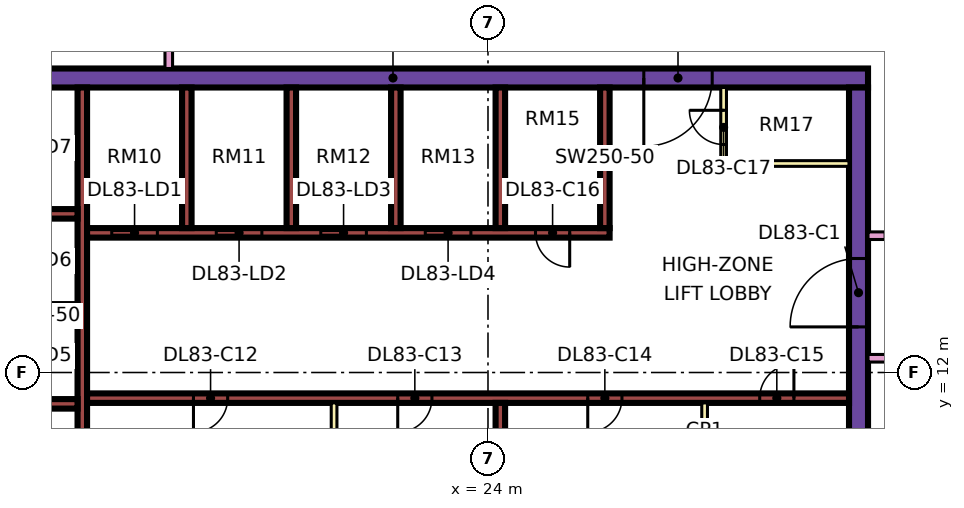
"""IFC4 building model, lengths in metres.
Left out: names, types, materials, properties, quantities, classifications, styles, units other than length and angle.
Written with IfcOpenShell. Run it as: python <this file> out.ifc"""

import sys

from ifc_helpers import new_model, si_unit, direction, frame, frame_2d, origin, place, context, subcontext, project, spatial, rectangle, extrude, element, fill, save


model = new_model("IFC4")
c1 = context("Model", 3, precision=1e-05, world=origin(), true_north=direction((0.0, 1.0)))
c2 = subcontext(c1, "Body", "Model", "MODEL_VIEW")
j1 = project(units=[si_unit("LENGTHUNIT", "METRE"), si_unit("PLANEANGLEUNIT", "RADIAN")], contexts=[c1])
p1 = place(None, origin())
s1 = spatial("IfcSite", under=j1, at=p1, CompositionType="ELEMENT")
p2 = place(p1, origin())
s2 = spatial("IfcBuilding", under=s1, at=p2, CompositionType="ELEMENT")
p3 = place(p2, frame((0.0, 0.0, 357.65)))
s3 = spatial("IfcBuildingStorey", under=s2, at=p3, CompositionType="ELEMENT", Elevation=357.65)
p4 = place(p3, frame((9.0, 19.75, 0.0), z_axis=(0.0, 0.0, 1.0), x_axis=(1.0, 0.0, 0.0)))
e1 = element("IfcWall", 1, at=p4, inside=s3, PredefinedType="SHEAR", context=c2, shape_type="SweptSolid", body=[
    extrude(rectangle(XDim=25.0, YDim=0.5, at=frame_2d((12.5, 0.0))), origin(), (0.0, 0.0, 1.0), 3.75),
])
p5 = place(p4, frame((19.1, 0.0, 0.0)))
e2 = element("IfcOpeningElement", 2, at=p5, cuts=e1, PredefinedType="OPENING", context=c2, shape_type="SweptSolid", body=[
    extrude(rectangle(XDim=1.8, YDim=2.4, at=frame_2d((0.9, 1.2))), frame((0.0, 0.26, 0.0), z_axis=(0.0, -1.0, 0.0), x_axis=(1.0, 0.0, 0.0)), (0.0, 0.0, 1.0), 0.52),
])
p6 = place(p3, frame((33.75, 7.5, 0.0), z_axis=(0.0, 0.0, 1.0), x_axis=(0.0, 1.0, 0.0)))
e3 = element("IfcWall", 3, at=p6, inside=s3, PredefinedType="SHEAR", context=c2, shape_type="SweptSolid", body=[
    extrude(rectangle(XDim=12.0, YDim=0.5, at=frame_2d((6.0, 0.0))), origin(), (0.0, 0.0, 1.0), 3.75),
])
p7 = place(p6, frame((5.7, 0.0, 0.0)))
e4 = element("IfcOpeningElement", 4, at=p7, cuts=e3, PredefinedType="OPENING", context=c2, shape_type="SweptSolid", body=[
    extrude(rectangle(XDim=1.8, YDim=2.4, at=frame_2d((0.9, 1.2))), frame((0.0, 0.26, 0.0), z_axis=(0.0, -1.0, 0.0), x_axis=(1.0, 0.0, 0.0)), (0.0, 0.0, 1.0), 0.52),
])
p8 = place(p3, frame((13.325, 7.5, 0.0), z_axis=(0.0, 0.0, 1.0), x_axis=(0.0, 1.0, 0.0)))
e5 = element("IfcWall", 5, at=p8, inside=s3, PredefinedType="SHEAR", context=c2, shape_type="SweptSolid", body=[
    extrude(rectangle(XDim=12.0, YDim=0.25, at=frame_2d((6.0, 0.0))), origin(), (0.0, 0.0, 1.0), 3.75),
])
p9 = place(p3, frame((13.45, 11.325, 0.0), z_axis=(0.0, 0.0, 1.0), x_axis=(1.0, 0.0, 0.0)))
e6 = element("IfcWall", 6, at=p9, inside=s3, PredefinedType="SHEAR", context=c2, shape_type="SweptSolid", body=[
    extrude(rectangle(XDim=20.05, YDim=0.25, at=frame_2d((10.025, 0.0))), origin(), (0.0, 0.0, 1.0), 3.75),
])
p10 = place(p9, frame((2.8, 0.0, 0.0)))
e7 = element("IfcOpeningElement", 7, at=p10, cuts=e6, PredefinedType="OPENING", context=c2, shape_type="SweptSolid", body=[
    extrude(rectangle(XDim=0.9, YDim=2.1, at=frame_2d((0.45, 1.05))), frame((0.0, 0.135, 0.0), z_axis=(0.0, -1.0, 0.0), x_axis=(1.0, 0.0, 0.0)), (0.0, 0.0, 1.0), 0.27),
])
p11 = place(p9, frame((8.175, 0.0, 0.0)))
e8 = element("IfcOpeningElement", 8, at=p11, cuts=e6, PredefinedType="OPENING", context=c2, shape_type="SweptSolid", body=[
    extrude(rectangle(XDim=0.9, YDim=2.1, at=frame_2d((0.45, 1.05))), frame((0.0, 0.135, 0.0), z_axis=(0.0, -1.0, 0.0), x_axis=(1.0, 0.0, 0.0)), (0.0, 0.0, 1.0), 0.27),
])
p12 = place(p9, frame((13.175, 0.0, 0.0)))
e9 = element("IfcOpeningElement", 9, at=p12, cuts=e6, PredefinedType="OPENING", context=c2, shape_type="SweptSolid", body=[
    extrude(rectangle(XDim=0.9, YDim=2.1, at=frame_2d((0.45, 1.05))), frame((0.0, 0.135, 0.0), z_axis=(0.0, -1.0, 0.0), x_axis=(1.0, 0.0, 0.0)), (0.0, 0.0, 1.0), 0.27),
])
p13 = place(p9, frame((17.7, 0.0, 0.0)))
e10 = element("IfcOpeningElement", 10, at=p13, cuts=e6, PredefinedType="OPENING", context=c2, shape_type="SweptSolid", body=[
    extrude(rectangle(XDim=0.9, YDim=2.1, at=frame_2d((0.45, 1.05))), frame((0.0, 0.135, 0.0), z_axis=(0.0, -1.0, 0.0), x_axis=(1.0, 0.0, 0.0)), (0.0, 0.0, 1.0), 0.27),
])
p14 = place(p3, frame((13.45, 15.675, 0.0), z_axis=(0.0, 0.0, 1.0), x_axis=(1.0, 0.0, 0.0)))
e11 = element("IfcWall", 11, at=p14, inside=s3, PredefinedType="SHEAR", context=c2, shape_type="SweptSolid", body=[
    extrude(rectangle(XDim=13.75, YDim=0.25, at=frame_2d((6.875, 0.0))), origin(), (0.0, 0.0, 1.0), 3.75),
])
p15 = place(p14, frame((0.65, 0.0, 0.0)))
e12 = element("IfcOpeningElement", 12, at=p15, cuts=e11, PredefinedType="OPENING", context=c2, shape_type="SweptSolid", body=[
    extrude(rectangle(XDim=1.2, YDim=2.2, at=frame_2d((0.6, 1.1))), frame((0.0, 0.135, 0.0), z_axis=(0.0, -1.0, 0.0), x_axis=(1.0, 0.0, 0.0)), (0.0, 0.0, 1.0), 0.27),
])
p16 = place(p14, frame((3.4, 0.0, 0.0)))
e13 = element("IfcOpeningElement", 13, at=p16, cuts=e11, PredefinedType="OPENING", context=c2, shape_type="SweptSolid", body=[
    extrude(rectangle(XDim=1.2, YDim=2.2, at=frame_2d((0.6, 1.1))), frame((0.0, 0.135, 0.0), z_axis=(0.0, -1.0, 0.0), x_axis=(1.0, 0.0, 0.0)), (0.0, 0.0, 1.0), 0.27),
])
p17 = place(p14, frame((6.15, 0.0, 0.0)))
e14 = element("IfcOpeningElement", 14, at=p17, cuts=e11, PredefinedType="OPENING", context=c2, shape_type="SweptSolid", body=[
    extrude(rectangle(XDim=1.2, YDim=2.2, at=frame_2d((0.6, 1.1))), frame((0.0, 0.135, 0.0), z_axis=(0.0, -1.0, 0.0), x_axis=(1.0, 0.0, 0.0)), (0.0, 0.0, 1.0), 0.27),
])
p18 = place(p14, frame((8.9, 0.0, 0.0)))
e15 = element("IfcOpeningElement", 15, at=p18, cuts=e11, PredefinedType="OPENING", context=c2, shape_type="SweptSolid", body=[
    extrude(rectangle(XDim=1.2, YDim=2.2, at=frame_2d((0.6, 1.1))), frame((0.0, 0.135, 0.0), z_axis=(0.0, -1.0, 0.0), x_axis=(1.0, 0.0, 0.0)), (0.0, 0.0, 1.0), 0.27),
])
p19 = place(p14, frame((11.8, 0.0, 0.0)))
e16 = element("IfcOpeningElement", 16, at=p19, cuts=e11, PredefinedType="OPENING", context=c2, shape_type="SweptSolid", body=[
    extrude(rectangle(XDim=0.9, YDim=2.1, at=frame_2d((0.45, 1.05))), frame((0.0, 0.135, 0.0), z_axis=(0.0, -1.0, 0.0), x_axis=(1.0, 0.0, 0.0)), (0.0, 0.0, 1.0), 0.27),
])
for number, where, z_axis, x_axis in (
    (17, (10.2, 11.175, 0.0), (0.0, 0.0, 1.0), (1.0, 0.0, 0.0)),
    (18, (10.2, 13.675, 0.0), (0.0, 0.0, 1.0), (1.0, 0.0, 0.0)),
    (19, (10.2, 16.175, 0.0), (0.0, 0.0, 1.0), (1.0, 0.0, 0.0)),
):
    element("IfcWall", number, at=place(p3, frame(where, z_axis=z_axis, x_axis=x_axis)), inside=s3, PredefinedType="SHEAR", context=c2, shape_type="SweptSolid", body=[
        extrude(rectangle(XDim=3.0, YDim=0.25, at=frame_2d((1.5, 0.0))), origin(), (0.0, 0.0, 1.0), 3.75),
    ])
for number, where, z_axis, x_axis in (
    (20, (24.325, 7.5, 0.0), (0.0, 0.0, 1.0), (0.0, 1.0, 0.0)),
    (21, (16.075, 15.8, 0.0), (0.0, 0.0, 1.0), (0.0, 1.0, 0.0)),
    (22, (18.825, 15.8, 0.0), (0.0, 0.0, 1.0), (0.0, 1.0, 0.0)),
    (23, (21.575, 15.8, 0.0), (0.0, 0.0, 1.0), (0.0, 1.0, 0.0)),
    (24, (24.325, 15.8, 0.0), (0.0, 0.0, 1.0), (0.0, 1.0, 0.0)),
    (25, (27.075, 15.8, 0.0), (0.0, 0.0, 1.0), (0.0, 1.0, 0.0)),
):
    element("IfcWall", number, at=place(p3, frame(where, z_axis=z_axis, x_axis=x_axis)), inside=s3, PredefinedType="SHEAR", context=c2, shape_type="SweptSolid", body=[
        extrude(rectangle(XDim=3.7, YDim=0.25, at=frame_2d((1.85, 0.0))), origin(), (0.0, 0.0, 1.0), 3.75),
    ])
p20 = place(p3, frame((-1.447, 12.553, 0.0), z_axis=(0.0, 0.0, 1.0), x_axis=(0.707106781187, -0.707106781187, 0.0)))
e26 = element("IfcWall", 26, at=p20, inside=s3, PredefinedType="SOLIDWALL", context=c2, shape_type="SweptSolid", body=[
    extrude(rectangle(XDim=19.799, YDim=0.15, at=frame_2d((9.899, 0.0))), origin(), (0.0, 0.0, 1.0), 3.35),
])
p21 = place(p20, frame((2.212, 0.0, 0.45)))
e27 = element("IfcOpeningElement", 27, at=p21, cuts=e26, PredefinedType="OPENING", context=c2, shape_type="SweptSolid", body=[
    extrude(rectangle(XDim=3.0, YDim=2.4, at=frame_2d((1.5, 1.2))), frame((0.0, 0.085, 0.0), z_axis=(0.0, -1.0, 0.0), x_axis=(1.0, 0.0, 0.0)), (0.0, 0.0, 1.0), 0.17),
])
p22 = place(p20, frame((10.216, 0.0, 0.45)))
e28 = element("IfcOpeningElement", 28, at=p22, cuts=e26, PredefinedType="OPENING", context=c2, shape_type="SweptSolid", body=[
    extrude(rectangle(XDim=3.0, YDim=2.4, at=frame_2d((1.5, 1.2))), frame((0.0, 0.085, 0.0), z_axis=(0.0, -1.0, 0.0), x_axis=(1.0, 0.0, 0.0)), (0.0, 0.0, 1.0), 0.17),
])
for number, where, z_axis, x_axis in (
    (29, (19.95, 7.5, 0.0), (0.0, 0.0, 1.0), (0.0, 1.0, 0.0)),
    (30, (29.7, 7.5, 0.0), (0.0, 0.0, 1.0), (0.0, 1.0, 0.0)),
):
    element("IfcWall", number, at=place(p3, frame(where, z_axis=z_axis, x_axis=x_axis)), inside=s3, PredefinedType="PARTITIONING", context=c2, shape_type="SweptSolid", body=[
        extrude(rectangle(XDim=3.7, YDim=0.15, at=frame_2d((1.85, 0.0))), origin(), (0.0, 0.0, 1.0), 3.35),
    ])
p23 = place(p3, frame((30.2, 17.5, 0.0), z_axis=(0.0, 0.0, 1.0), x_axis=(0.0, 1.0, 0.0)))
e31 = element("IfcWall", 31, at=p23, inside=s3, PredefinedType="PARTITIONING", context=c2, shape_type="SweptSolid", body=[
    extrude(rectangle(XDim=2.0, YDim=0.15, at=frame_2d((1.0, 0.0))), origin(), (0.0, 0.0, 1.0), 3.35),
])
p24 = place(p23, frame((0.5, 0.0, 0.0)))
e32 = element("IfcOpeningElement", 32, at=p24, cuts=e31, PredefinedType="OPENING", context=c2, shape_type="SweptSolid", body=[
    extrude(rectangle(XDim=0.9, YDim=2.1, at=frame_2d((0.45, 1.05))), frame((0.0, 0.085, 0.0), z_axis=(0.0, -1.0, 0.0), x_axis=(1.0, 0.0, 0.0)), (0.0, 0.0, 1.0), 0.17),
])
p25 = place(p3, frame((30.2, 17.5, 0.0), z_axis=(0.0, 0.0, 1.0), x_axis=(1.0, 0.0, 0.0)))
e33 = element("IfcWall", 33, at=p25, inside=s3, PredefinedType="PARTITIONING", context=c2, shape_type="SweptSolid", body=[
    extrude(rectangle(XDim=3.3, YDim=0.15, at=frame_2d((1.65, 0.0))), origin(), (0.0, 0.0, 1.0), 3.35),
])
p26 = place(p3, frame((15.6, 20.0, 0.0), z_axis=(0.0, 0.0, 1.0), x_axis=(0.0, 1.0, 0.0)))
e34 = element("IfcWall", 34, at=p26, inside=s3, PredefinedType="PARTITIONING", context=c2, shape_type="SweptSolid", body=[
    extrude(rectangle(XDim=27.775, YDim=0.2, at=frame_2d((13.887, 0.0))), origin(), (0.0, 0.0, 1.0), 3.35),
])
p27 = place(p26, frame((5.95, 0.0, 0.0)))
e35 = element("IfcOpeningElement", 35, at=p27, cuts=e34, PredefinedType="OPENING", context=c2, shape_type="SweptSolid", body=[
    extrude(rectangle(XDim=1.0, YDim=2.1, at=frame_2d((0.5, 1.05))), frame((0.0, 0.11, 0.0), z_axis=(0.0, -1.0, 0.0), x_axis=(1.0, 0.0, 0.0)), (0.0, 0.0, 1.0), 0.22),
])
p28 = place(p26, frame((12.0, 0.0, 0.0)))
e36 = element("IfcOpeningElement", 36, at=p28, cuts=e34, PredefinedType="OPENING", context=c2, shape_type="SweptSolid", body=[
    extrude(rectangle(XDim=1.0, YDim=2.1, at=frame_2d((0.5, 1.05))), frame((0.0, 0.11, 0.0), z_axis=(0.0, -1.0, 0.0), x_axis=(1.0, 0.0, 0.0)), (0.0, 0.0, 1.0), 0.22),
])
p29 = place(p26, frame((16.75, 0.0, 0.0)))
e37 = element("IfcOpeningElement", 37, at=p29, cuts=e34, PredefinedType="OPENING", context=c2, shape_type="SweptSolid", body=[
    extrude(rectangle(XDim=1.0, YDim=2.1, at=frame_2d((0.5, 1.05))), frame((0.0, 0.11, 0.0), z_axis=(0.0, -1.0, 0.0), x_axis=(1.0, 0.0, 0.0)), (0.0, 0.0, 1.0), 0.22),
])
p30 = place(p26, frame((1.15, 0.0, 0.0)))
e38 = element("IfcOpeningElement", 38, at=p30, cuts=e34, PredefinedType="OPENING", context=c2, shape_type="SweptSolid", body=[
    extrude(rectangle(XDim=1.8, YDim=2.1, at=frame_2d((0.9, 1.05))), frame((0.0, 0.11, 0.0), z_axis=(0.0, -1.0, 0.0), x_axis=(1.0, 0.0, 0.0)), (0.0, 0.0, 1.0), 0.22),
])
p31 = place(p26, frame((25.9, 0.0, 0.0)))
e39 = element("IfcOpeningElement", 39, at=p31, cuts=e34, PredefinedType="OPENING", context=c2, shape_type="SweptSolid", body=[
    extrude(rectangle(XDim=1.0, YDim=2.1, at=frame_2d((0.5, 1.05))), frame((0.0, 0.11, 0.0), z_axis=(0.0, -1.0, 0.0), x_axis=(1.0, 0.0, 0.0)), (0.0, 0.0, 1.0), 0.22),
])
p32 = place(p3, frame((34.0, 12.375, 0.0), z_axis=(0.0, 0.0, 1.0), x_axis=(1.0, 0.0, 0.0)))
e40 = element("IfcWall", 40, at=p32, inside=s3, PredefinedType="PARTITIONING", context=c2, shape_type="SweptSolid", body=[
    extrude(rectangle(XDim=2.376, YDim=0.2, at=frame_2d((1.188, 0.0))), origin(), (0.0, 0.0, 1.0), 3.35),
])
p33 = place(p3, frame((34.0, 15.6, 0.0), z_axis=(0.0, 0.0, 1.0), x_axis=(1.0, 0.0, 0.0)))
e41 = element("IfcWall", 41, at=p33, inside=s3, PredefinedType="PARTITIONING", context=c2, shape_type="SweptSolid", body=[
    extrude(rectangle(XDim=10.35, YDim=0.2, at=frame_2d((5.175, 0.0))), origin(), (0.0, 0.0, 1.0), 3.35),
])
p34 = place(p33, frame((5.6, 0.0, 0.0)))
e42 = element("IfcOpeningElement", 42, at=p34, cuts=e41, PredefinedType="OPENING", context=c2, shape_type="SweptSolid", body=[
    extrude(rectangle(XDim=1.0, YDim=2.1, at=frame_2d((0.5, 1.05))), frame((0.0, 0.11, 0.0), z_axis=(0.0, -1.0, 0.0), x_axis=(1.0, 0.0, 0.0)), (0.0, 0.0, 1.0), 0.22),
])
p35 = place(p33, frame((0.45, 0.0, 0.0)))
e43 = element("IfcOpeningElement", 43, at=p35, cuts=e41, PredefinedType="OPENING", context=c2, shape_type="SweptSolid", body=[
    extrude(rectangle(XDim=1.2, YDim=2.1, at=frame_2d((0.6, 1.05))), frame((0.0, 0.11, 0.0), z_axis=(0.0, -1.0, 0.0), x_axis=(1.0, 0.0, 0.0)), (0.0, 0.0, 1.0), 0.22),
])
p36 = place(p15, origin())
e44 = element("IfcDoor", 44, at=p36, inside=s3, OperationType="DOUBLE_DOOR_SLIDING", PredefinedType="DOOR", context=c2, shape_type="SweptSolid", body=[
    extrude(rectangle(XDim=1.2, YDim=2.2, at=frame_2d((0.6, 1.1))), frame((0.0, 0.025, 0.0), z_axis=(0.0, -1.0, 0.0), x_axis=(1.0, 0.0, 0.0)), (0.0, 0.0, 1.0), 0.05),
])
fill(e12, e44)
p37 = place(p16, origin())
e45 = element("IfcDoor", 45, at=p37, inside=s3, OperationType="DOUBLE_DOOR_SLIDING", PredefinedType="DOOR", context=c2, shape_type="SweptSolid", body=[
    extrude(rectangle(XDim=1.2, YDim=2.2, at=frame_2d((0.6, 1.1))), frame((0.0, 0.025, 0.0), z_axis=(0.0, -1.0, 0.0), x_axis=(1.0, 0.0, 0.0)), (0.0, 0.0, 1.0), 0.05),
])
fill(e13, e45)
p38 = place(p17, origin())
e46 = element("IfcDoor", 46, at=p38, inside=s3, OperationType="DOUBLE_DOOR_SLIDING", PredefinedType="DOOR", context=c2, shape_type="SweptSolid", body=[
    extrude(rectangle(XDim=1.2, YDim=2.2, at=frame_2d((0.6, 1.1))), frame((0.0, 0.025, 0.0), z_axis=(0.0, -1.0, 0.0), x_axis=(1.0, 0.0, 0.0)), (0.0, 0.0, 1.0), 0.05),
])
fill(e14, e46)
p39 = place(p18, origin())
e47 = element("IfcDoor", 47, at=p39, inside=s3, OperationType="DOUBLE_DOOR_SLIDING", PredefinedType="DOOR", context=c2, shape_type="SweptSolid", body=[
    extrude(rectangle(XDim=1.2, YDim=2.2, at=frame_2d((0.6, 1.1))), frame((0.0, 0.025, 0.0), z_axis=(0.0, -1.0, 0.0), x_axis=(1.0, 0.0, 0.0)), (0.0, 0.0, 1.0), 0.05),
])
fill(e15, e47)
p40 = place(p7, origin())
e48 = element("IfcDoor", 48, at=p40, inside=s3, OperationType="DOUBLE_DOOR_SINGLE_SWING", PredefinedType="DOOR", context=c2, shape_type="SweptSolid", body=[
    extrude(rectangle(XDim=1.8, YDim=2.4, at=frame_2d((0.9, 1.2))), frame((0.0, 0.025, 0.0), z_axis=(0.0, -1.0, 0.0), x_axis=(1.0, 0.0, 0.0)), (0.0, 0.0, 1.0), 0.05),
])
fill(e4, e48)
p41 = place(p5, frame((1.8, 0.0, 0.0), z_axis=(0.0, 0.0, 1.0), x_axis=(-1.0, 0.0, 0.0)))
e49 = element("IfcDoor", 49, at=p41, inside=s3, OperationType="DOUBLE_DOOR_SINGLE_SWING", PredefinedType="DOOR", context=c2, shape_type="SweptSolid", body=[
    extrude(rectangle(XDim=1.8, YDim=2.4, at=frame_2d((0.9, 1.2))), frame((0.0, 0.025, 0.0), z_axis=(0.0, -1.0, 0.0), x_axis=(1.0, 0.0, 0.0)), (0.0, 0.0, 1.0), 0.05),
])
fill(e2, e49)
p42 = place(p10, frame((0.9, 0.0, 0.0), z_axis=(0.0, 0.0, 1.0), x_axis=(-1.0, 0.0, 0.0)))
e50 = element("IfcDoor", 50, at=p42, inside=s3, OperationType="SINGLE_SWING_LEFT", PredefinedType="DOOR", context=c2, shape_type="SweptSolid", body=[
    extrude(rectangle(XDim=0.9, YDim=2.1, at=frame_2d((0.45, 1.05))), frame((0.0, 0.025, 0.0), z_axis=(0.0, -1.0, 0.0), x_axis=(1.0, 0.0, 0.0)), (0.0, 0.0, 1.0), 0.05),
])
fill(e7, e50)
p43 = place(p11, frame((0.9, 0.0, 0.0), z_axis=(0.0, 0.0, 1.0), x_axis=(-1.0, 0.0, 0.0)))
e51 = element("IfcDoor", 51, at=p43, inside=s3, OperationType="SINGLE_SWING_LEFT", PredefinedType="DOOR", context=c2, shape_type="SweptSolid", body=[
    extrude(rectangle(XDim=0.9, YDim=2.1, at=frame_2d((0.45, 1.05))), frame((0.0, 0.025, 0.0), z_axis=(0.0, -1.0, 0.0), x_axis=(1.0, 0.0, 0.0)), (0.0, 0.0, 1.0), 0.05),
])
fill(e8, e51)
p44 = place(p12, frame((0.9, 0.0, 0.0), z_axis=(0.0, 0.0, 1.0), x_axis=(-1.0, 0.0, 0.0)))
e52 = element("IfcDoor", 52, at=p44, inside=s3, OperationType="SINGLE_SWING_LEFT", PredefinedType="DOOR", context=c2, shape_type="SweptSolid", body=[
    extrude(rectangle(XDim=0.9, YDim=2.1, at=frame_2d((0.45, 1.05))), frame((0.0, 0.025, 0.0), z_axis=(0.0, -1.0, 0.0), x_axis=(1.0, 0.0, 0.0)), (0.0, 0.0, 1.0), 0.05),
])
fill(e9, e52)
p45 = place(p13, frame((0.9, 0.0, 0.0), z_axis=(0.0, 0.0, 1.0), x_axis=(-1.0, 0.0, 0.0)))
e53 = element("IfcDoor", 53, at=p45, inside=s3, OperationType="SINGLE_SWING_RIGHT", PredefinedType="DOOR", context=c2, shape_type="SweptSolid", body=[
    extrude(rectangle(XDim=0.9, YDim=2.1, at=frame_2d((0.45, 1.05))), frame((0.0, 0.025, 0.0), z_axis=(0.0, -1.0, 0.0), x_axis=(1.0, 0.0, 0.0)), (0.0, 0.0, 1.0), 0.05),
])
fill(e10, e53)
p46 = place(p19, origin())
e54 = element("IfcDoor", 54, at=p46, inside=s3, OperationType="SINGLE_SWING_RIGHT", PredefinedType="DOOR", context=c2, shape_type="SweptSolid", body=[
    extrude(rectangle(XDim=0.9, YDim=2.1, at=frame_2d((0.45, 1.05))), frame((0.0, 0.025, 0.0), z_axis=(0.0, -1.0, 0.0), x_axis=(1.0, 0.0, 0.0)), (0.0, 0.0, 1.0), 0.05),
])
fill(e16, e54)
p47 = place(p24, frame((0.9, 0.0, 0.0), z_axis=(0.0, 0.0, 1.0), x_axis=(-1.0, 0.0, 0.0)))
e55 = element("IfcDoor", 55, at=p47, inside=s3, OperationType="SINGLE_SWING_RIGHT", PredefinedType="DOOR", context=c2, shape_type="SweptSolid", body=[
    extrude(rectangle(XDim=0.9, YDim=2.1, at=frame_2d((0.45, 1.05))), frame((0.0, 0.025, 0.0), z_axis=(0.0, -1.0, 0.0), x_axis=(1.0, 0.0, 0.0)), (0.0, 0.0, 1.0), 0.05),
])
fill(e32, e55)
save(model, sys.argv[1])
